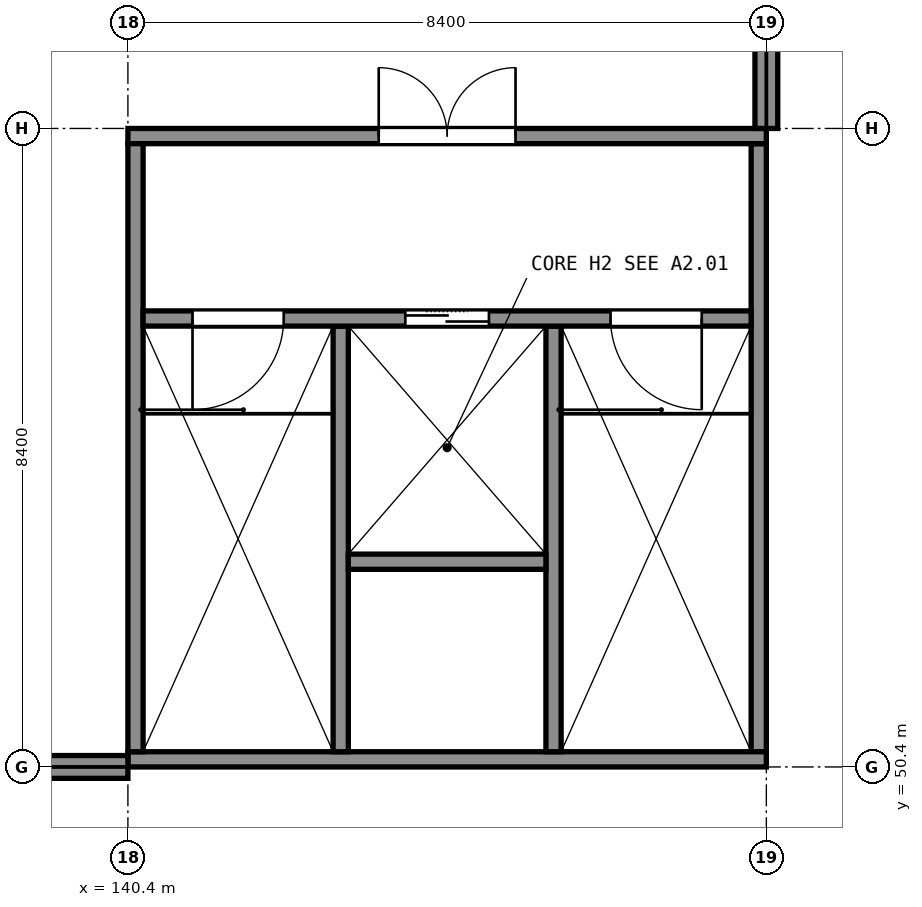
"""IFC4 building model, lengths in metres.
Left out: names, types, materials, properties, quantities, classifications, styles, units other than length and angle.
Written with IfcOpenShell. Run it as: python <this file> out.ifc"""

import sys

from ifc_helpers import new_model, si_unit, direction, frame, frame_2d, origin, place, context, subcontext, project, spatial, polyline, rectangle, outline, extrude, element, fill, save


model = new_model("IFC4")
c1 = context("Model", 3, precision=1e-05, world=origin(), true_north=direction((0.0, 1.0)))
c2 = subcontext(c1, "Body", "Model", "MODEL_VIEW")
j1 = project(units=[si_unit("LENGTHUNIT", "METRE"), si_unit("PLANEANGLEUNIT", "RADIAN")], contexts=[c1])
p1 = place(None, origin())
s1 = spatial("IfcSite", under=j1, at=p1, CompositionType="ELEMENT")
p2 = place(p1, origin())
s2 = spatial("IfcBuilding", under=s1, at=p2, CompositionType="ELEMENT")
p3 = place(p2, frame((0.0, 0.0, 25.0)))
s3 = spatial("IfcBuildingStorey", under=s2, at=p3, CompositionType="ELEMENT", Elevation=25.0)
p4 = place(p3, frame((140.4, 50.5, 0.0), z_axis=(0.0, 0.0, 1.0), x_axis=(1.0, 0.0, 0.0)))
e1 = element("IfcWall", 1, at=p4, inside=s3, PredefinedType="SHEAR", context=c2, shape_type="SweptSolid", body=[
    extrude(rectangle(XDim=8.4, YDim=0.2, at=frame_2d((4.2, 0.0))), origin(), (0.0, 0.0, 1.0), 14.47),
])
p5 = place(p3, frame((140.4, 58.7, 0.0), z_axis=(0.0, 0.0, 1.0), x_axis=(1.0, 0.0, 0.0)))
e2 = element("IfcWall", 2, at=p5, inside=s3, PredefinedType="SHEAR", context=c2, shape_type="SweptSolid", body=[
    extrude(rectangle(XDim=8.4, YDim=0.2, at=frame_2d((4.2, 0.0))), origin(), (0.0, 0.0, 1.0), 14.47),
])
p6 = place(p5, frame((3.3, 0.0, 0.0)))
e3 = element("IfcOpeningElement", 3, at=p6, cuts=e2, PredefinedType="OPENING", context=c2, shape_type="SweptSolid", body=[
    extrude(rectangle(XDim=1.8, YDim=2.1, at=frame_2d((0.9, 1.05))), frame((0.0, 0.11, 0.0), z_axis=(0.0, -1.0, 0.0), x_axis=(1.0, 0.0, 0.0)), (0.0, 0.0, 1.0), 0.22),
])
for number, where, z_axis, x_axis in (
    (4, (140.5, 50.6, 0.0), (0.0, 0.0, 1.0), (0.0, 1.0, 0.0)),
    (5, (148.7, 50.6, 0.0), (0.0, 0.0, 1.0), (0.0, 1.0, 0.0)),
):
    element("IfcWall", number, at=place(p3, frame(where, z_axis=z_axis, x_axis=x_axis)), inside=s3, PredefinedType="SHEAR", context=c2, shape_type="SweptSolid", body=[
        extrude(rectangle(XDim=8.0, YDim=0.2, at=frame_2d((4.0, 0.0))), origin(), (0.0, 0.0, 1.0), 14.47),
    ])
p7 = place(p3, frame((140.6, 56.3, 0.0), z_axis=(0.0, 0.0, 1.0), x_axis=(1.0, 0.0, 0.0)))
e6 = element("IfcWall", 6, at=p7, inside=s3, PredefinedType="SHEAR", context=c2, shape_type="SweptSolid", body=[
    extrude(rectangle(XDim=8.0, YDim=0.2, at=frame_2d((4.0, 0.0))), origin(), (0.0, 0.0, 1.0), 14.47),
])
p8 = place(p7, frame((0.65, 0.0, 0.0)))
e7 = element("IfcOpeningElement", 7, at=p8, cuts=e6, PredefinedType="OPENING", context=c2, shape_type="SweptSolid", body=[
    extrude(rectangle(XDim=1.2, YDim=2.1, at=frame_2d((0.6, 1.05))), frame((0.0, 0.11, 0.0), z_axis=(0.0, -1.0, 0.0), x_axis=(1.0, 0.0, 0.0)), (0.0, 0.0, 1.0), 0.22),
])
p9 = place(p7, frame((6.15, 0.0, 0.0)))
e8 = element("IfcOpeningElement", 8, at=p9, cuts=e6, PredefinedType="OPENING", context=c2, shape_type="SweptSolid", body=[
    extrude(rectangle(XDim=1.2, YDim=2.1, at=frame_2d((0.6, 1.05))), frame((0.0, 0.11, 0.0), z_axis=(0.0, -1.0, 0.0), x_axis=(1.0, 0.0, 0.0)), (0.0, 0.0, 1.0), 0.22),
])
p10 = place(p7, frame((3.45, 0.0, 0.0)))
e9 = element("IfcOpeningElement", 9, at=p10, cuts=e6, PredefinedType="OPENING", context=c2, shape_type="SweptSolid", body=[
    extrude(rectangle(XDim=1.1, YDim=2.1, at=frame_2d((0.55, 1.05))), frame((0.0, 0.11, 0.0), z_axis=(0.0, -1.0, 0.0), x_axis=(1.0, 0.0, 0.0)), (0.0, 0.0, 1.0), 0.22),
])
for number, where, z_axis, x_axis in (
    (10, (143.2, 50.6, 0.0), (0.0, 0.0, 1.0), (0.0, 1.0, 0.0)),
    (11, (146.0, 50.6, 0.0), (0.0, 0.0, 1.0), (0.0, 1.0, 0.0)),
):
    element("IfcWall", number, at=place(p3, frame(where, z_axis=z_axis, x_axis=x_axis)), inside=s3, PredefinedType="SHEAR", context=c2, shape_type="SweptSolid", body=[
        extrude(rectangle(XDim=5.6, YDim=0.2, at=frame_2d((2.8, 0.0))), origin(), (0.0, 0.0, 1.0), 14.47),
    ])
p11 = place(p3, frame((143.3, 53.1, 0.0), z_axis=(0.0, 0.0, 1.0), x_axis=(1.0, 0.0, 0.0)))
e12 = element("IfcWall", 12, at=p11, inside=s3, PredefinedType="SHEAR", context=c2, shape_type="SweptSolid", body=[
    extrude(rectangle(XDim=2.6, YDim=0.2, at=frame_2d((1.3, 0.0))), origin(), (0.0, 0.0, 1.0), 14.47),
])
p12 = place(p3, frame((132.3, 50.4, 0.0), z_axis=(0.0, 0.0, 1.0), x_axis=(1.0, 0.0, 0.0)))
e13 = element("IfcWall", 13, at=p12, inside=s3, PredefinedType="SOLIDWALL", context=c2, shape_type="SweptSolid", body=[
    extrude(rectangle(XDim=8.1, YDim=0.3, at=frame_2d((4.05, 0.0))), origin(), (0.0, 0.0, 1.0), 10.996),
])
p13 = place(p12, frame((2.35, 0.0, 1.5)))
e14 = element("IfcOpeningElement", 14, at=p13, cuts=e13, PredefinedType="OPENING", context=c2, shape_type="SweptSolid", body=[
    extrude(rectangle(XDim=0.6, YDim=2.4, at=frame_2d((0.3, 1.2))), frame((0.0, 0.16, 0.0), z_axis=(0.0, -1.0, 0.0), x_axis=(1.0, 0.0, 0.0)), (0.0, 0.0, 1.0), 0.32),
])
p14 = place(p12, frame((5.15, 0.0, 1.5)))
e15 = element("IfcOpeningElement", 15, at=p14, cuts=e13, PredefinedType="OPENING", context=c2, shape_type="SweptSolid", body=[
    extrude(rectangle(XDim=0.6, YDim=2.4, at=frame_2d((0.3, 1.2))), frame((0.0, 0.16, 0.0), z_axis=(0.0, -1.0, 0.0), x_axis=(1.0, 0.0, 0.0)), (0.0, 0.0, 1.0), 0.32),
])
p15 = place(p3, frame((148.8, 58.8, 0.0), z_axis=(0.0, 0.0, 1.0), x_axis=(0.0, 1.0, 0.0)))
e16 = element("IfcWall", 16, at=p15, inside=s3, PredefinedType="SOLIDWALL", context=c2, shape_type="SweptSolid", body=[
    extrude(outline(polyline([(0.0, 0.0), (8.1, 0.0), (8.1, 13.06), (0.0, 12.361), (0.0, 0.0)])), frame((0.0, 0.15, 0.0), z_axis=(0.0, -1.0, 0.0), x_axis=(1.0, 0.0, 0.0)), (0.0, 0.0, 1.0), 0.3),
])
p16 = place(p15, frame((2.35, 0.0, 1.5)))
e17 = element("IfcOpeningElement", 17, at=p16, cuts=e16, PredefinedType="OPENING", context=c2, shape_type="SweptSolid", body=[
    extrude(rectangle(XDim=0.6, YDim=2.4, at=frame_2d((0.3, 1.2))), frame((0.0, 0.16, 0.0), z_axis=(0.0, -1.0, 0.0), x_axis=(1.0, 0.0, 0.0)), (0.0, 0.0, 1.0), 0.32),
])
p17 = place(p15, frame((5.15, 0.0, 1.5)))
e18 = element("IfcOpeningElement", 18, at=p17, cuts=e16, PredefinedType="OPENING", context=c2, shape_type="SweptSolid", body=[
    extrude(rectangle(XDim=0.6, YDim=2.4, at=frame_2d((0.3, 1.2))), frame((0.0, 0.16, 0.0), z_axis=(0.0, -1.0, 0.0), x_axis=(1.0, 0.0, 0.0)), (0.0, 0.0, 1.0), 0.32),
])
p18 = place(p6, origin())
e19 = element("IfcDoor", 19, at=p18, inside=s3, OperationType="DOUBLE_DOOR_SINGLE_SWING", PredefinedType="DOOR", context=c2, shape_type="SweptSolid", body=[
    extrude(rectangle(XDim=1.8, YDim=2.1, at=frame_2d((0.9, 1.05))), frame((0.0, 0.025, 0.0), z_axis=(0.0, -1.0, 0.0), x_axis=(1.0, 0.0, 0.0)), (0.0, 0.0, 1.0), 0.05),
])
fill(e3, e19)
p19 = place(p8, origin())
e20 = element("IfcDoor", 20, at=p19, inside=s3, OperationType="SINGLE_SWING_LEFT", PredefinedType="DOOR", context=c2, shape_type="SweptSolid", body=[
    extrude(rectangle(XDim=1.2, YDim=2.1, at=frame_2d((0.6, 1.05))), frame((0.0, 0.025, 0.0), z_axis=(0.0, -1.0, 0.0), x_axis=(1.0, 0.0, 0.0)), (0.0, 0.0, 1.0), 0.05),
])
fill(e7, e20)
p20 = place(p9, origin())
e21 = element("IfcDoor", 21, at=p20, inside=s3, OperationType="SINGLE_SWING_RIGHT", PredefinedType="DOOR", context=c2, shape_type="SweptSolid", body=[
    extrude(rectangle(XDim=1.2, YDim=2.1, at=frame_2d((0.6, 1.05))), frame((0.0, 0.025, 0.0), z_axis=(0.0, -1.0, 0.0), x_axis=(1.0, 0.0, 0.0)), (0.0, 0.0, 1.0), 0.05),
])
fill(e8, e21)
p21 = place(p10, origin())
e22 = element("IfcDoor", 22, at=p21, inside=s3, OperationType="DOUBLE_DOOR_SLIDING", PredefinedType="DOOR", context=c2, shape_type="SweptSolid", body=[
    extrude(rectangle(XDim=1.1, YDim=2.1, at=frame_2d((0.55, 1.05))), frame((0.0, 0.025, 0.0), z_axis=(0.0, -1.0, 0.0), x_axis=(1.0, 0.0, 0.0)), (0.0, 0.0, 1.0), 0.05),
])
fill(e9, e22)
save(model, sys.argv[1])
